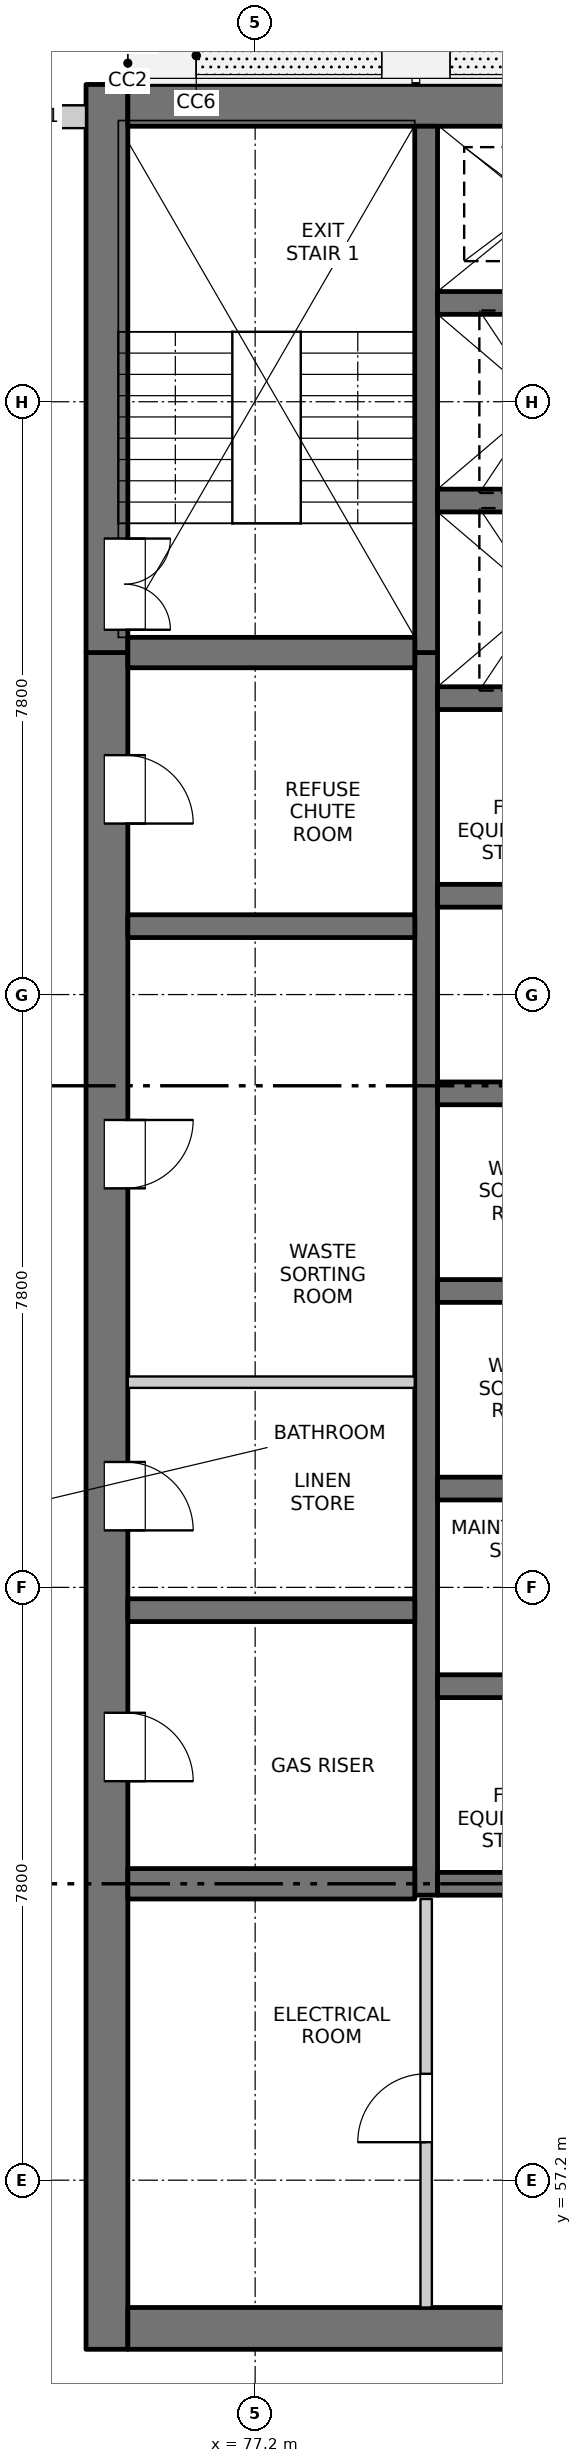
"""IFC4 building model, lengths in metres.
Left out: names, types, materials, properties, quantities, classifications, styles, units other than length and angle.
Written with IfcOpenShell. Run it as: python <this file> out.ifc"""

import sys

from ifc_helpers import new_model, si_unit, direction, frame, frame_2d, origin, place, context, subcontext, project, spatial, rectangle, extrude, element, fill, save


model = new_model("IFC4")
c1 = context("Model", 3, precision=1e-05, world=origin(), true_north=direction((0.0, 1.0)))
c2 = subcontext(c1, "Body", "Model", "MODEL_VIEW")
j1 = project(units=[si_unit("LENGTHUNIT", "METRE"), si_unit("PLANEANGLEUNIT", "RADIAN")], contexts=[c1])
p1 = place(None, origin())
s1 = spatial("IfcSite", under=j1, at=p1, CompositionType="ELEMENT")
p2 = place(p1, origin())
s2 = spatial("IfcBuilding", under=s1, at=p2, CompositionType="ELEMENT")
p3 = place(p2, frame((0.0, 0.0, 179.2)))
s3 = spatial("IfcBuildingStorey", under=s2, at=p3, CompositionType="ELEMENT", Elevation=179.2)
p4 = place(p3, frame((75.25, 54.975, -0.3), z_axis=(0.0, 0.0, 1.0), x_axis=(0.0, 1.0, 0.0)))
e1 = element("IfcWall", 1, at=p4, inside=s3, PredefinedType="SOLIDWALL", context=c2, shape_type="SweptSolid", body=[
    extrude(rectangle(XDim=22.325, YDim=0.55, at=frame_2d((11.163, 0.0))), origin(), (0.0, 0.0, 1.0), 3.45),
])
p5 = place(p4, frame((7.475, 0.0, 0.3)))
e2 = element("IfcOpeningElement", 2, at=p5, cuts=e1, PredefinedType="OPENING", context=c2, shape_type="SweptSolid", body=[
    extrude(rectangle(XDim=0.9, YDim=2.1, at=frame_2d((0.45, 1.05))), frame((0.0, 0.285, 0.0), z_axis=(0.0, -1.0, 0.0), x_axis=(1.0, 0.0, 0.0)), (0.0, 0.0, 1.0), 0.57),
])
p6 = place(p4, frame((10.775, 0.0, 0.3)))
e3 = element("IfcOpeningElement", 3, at=p6, cuts=e1, PredefinedType="OPENING", context=c2, shape_type="SweptSolid", body=[
    extrude(rectangle(XDim=0.9, YDim=2.1, at=frame_2d((0.45, 1.05))), frame((0.0, 0.285, 0.0), z_axis=(0.0, -1.0, 0.0), x_axis=(1.0, 0.0, 0.0)), (0.0, 0.0, 1.0), 0.57),
])
p7 = place(p4, frame((15.275, 0.0, 0.3)))
e4 = element("IfcOpeningElement", 4, at=p7, cuts=e1, PredefinedType="OPENING", context=c2, shape_type="SweptSolid", body=[
    extrude(rectangle(XDim=0.9, YDim=2.1, at=frame_2d((0.45, 1.05))), frame((0.0, 0.285, 0.0), z_axis=(0.0, -1.0, 0.0), x_axis=(1.0, 0.0, 0.0)), (0.0, 0.0, 1.0), 0.57),
])
p8 = place(p4, frame((20.075, 0.0, 0.3)))
e5 = element("IfcOpeningElement", 5, at=p8, cuts=e1, PredefinedType="OPENING", context=c2, shape_type="SweptSolid", body=[
    extrude(rectangle(XDim=0.9, YDim=2.1, at=frame_2d((0.45, 1.05))), frame((0.0, 0.285, 0.0), z_axis=(0.0, -1.0, 0.0), x_axis=(1.0, 0.0, 0.0)), (0.0, 0.0, 1.0), 0.57),
])
p9 = place(p3, frame((75.25, 77.3, -0.3), z_axis=(0.0, 0.0, 1.0), x_axis=(0.0, 1.0, 0.0)))
e6 = element("IfcWall", 6, at=p9, inside=s3, PredefinedType="SOLIDWALL", context=c2, shape_type="SweptSolid", body=[
    extrude(rectangle(XDim=7.475, YDim=0.55, at=frame_2d((3.737, 0.0))), origin(), (0.0, 0.0, 1.0), 3.45),
])
p10 = place(p9, frame((0.3, 0.0, 0.3)))
e7 = element("IfcOpeningElement", 7, at=p10, cuts=e6, PredefinedType="OPENING", context=c2, shape_type="SweptSolid", body=[
    extrude(rectangle(XDim=1.2, YDim=2.1, at=frame_2d((0.6, 1.05))), frame((0.0, 0.285, 0.0), z_axis=(0.0, -1.0, 0.0), x_axis=(1.0, 0.0, 0.0)), (0.0, 0.0, 1.0), 0.57),
])
p11 = place(p3, frame((75.525, 55.25, -0.3), z_axis=(0.0, 0.0, 1.0), x_axis=(1.0, 0.0, 0.0)))
e8 = element("IfcWall", 8, at=p11, inside=s3, PredefinedType="SOLIDWALL", context=c2, shape_type="SweptSolid", body=[
    extrude(rectangle(XDim=18.95, YDim=0.55, at=frame_2d((9.475, 0.0))), origin(), (0.0, 0.0, 1.0), 3.45),
])
p12 = place(p11, frame((8.725, 0.0, 0.3)))
e9 = element("IfcOpeningElement", 9, at=p12, cuts=e8, PredefinedType="OPENING", context=c2, shape_type="SweptSolid", body=[
    extrude(rectangle(XDim=1.5, YDim=2.1, at=frame_2d((0.75, 1.05))), frame((0.0, 0.285, 0.0), z_axis=(0.0, -1.0, 0.0), x_axis=(1.0, 0.0, 0.0)), (0.0, 0.0, 1.0), 0.57),
])
p13 = place(p3, frame((75.525, 84.5, -0.3), z_axis=(0.0, 0.0, 1.0), x_axis=(1.0, 0.0, 0.0)))
e10 = element("IfcWall", 10, at=p13, inside=s3, PredefinedType="SOLIDWALL", context=c2, shape_type="SweptSolid", body=[
    extrude(rectangle(XDim=18.95, YDim=0.55, at=frame_2d((9.475, 0.0))), origin(), (0.0, 0.0, 1.0), 3.45),
])
p14 = place(p3, frame((79.45, 60.95, -0.3), z_axis=(0.0, 0.0, 1.0), x_axis=(0.0, 1.0, 0.0)))
e11 = element("IfcWall", 11, at=p14, inside=s3, PredefinedType="SOLIDWALL", context=c2, shape_type="SweptSolid", body=[
    extrude(rectangle(XDim=16.35, YDim=0.3, at=frame_2d((8.175, 0.0))), origin(), (0.0, 0.0, 1.0), 3.45),
])
p15 = place(p3, frame((79.45, 77.3, -0.3), z_axis=(0.0, 0.0, 1.0), x_axis=(0.0, 1.0, 0.0)))
e12 = element("IfcWall", 12, at=p15, inside=s3, PredefinedType="SOLIDWALL", context=c2, shape_type="SweptSolid", body=[
    extrude(rectangle(XDim=6.925, YDim=0.3, at=frame_2d((3.462, 0.0))), origin(), (0.0, 0.0, 1.0), 3.45),
])
for number, where, z_axis, x_axis in (
    (13, (79.6, 61.1, -0.3), (0.0, 0.0, 1.0), (1.0, 0.0, 0.0)),
    (14, (79.6, 63.7, -0.3), (0.0, 0.0, 1.0), (1.0, 0.0, 0.0)),
    (15, (79.6, 66.3, -0.3), (0.0, 0.0, 1.0), (1.0, 0.0, 0.0)),
    (16, (79.6, 68.9, -0.3), (0.0, 0.0, 1.0), (1.0, 0.0, 0.0)),
    (17, (79.6, 71.5, -0.3), (0.0, 0.0, 1.0), (1.0, 0.0, 0.0)),
    (18, (79.6, 74.1, -0.3), (0.0, 0.0, 1.0), (1.0, 0.0, 0.0)),
    (19, (79.6, 76.7, -0.3), (0.0, 0.0, 1.0), (1.0, 0.0, 0.0)),
    (20, (79.6, 79.3, -0.3), (0.0, 0.0, 1.0), (1.0, 0.0, 0.0)),
    (21, (79.6, 81.9, -0.3), (0.0, 0.0, 1.0), (1.0, 0.0, 0.0)),
):
    element("IfcWall", number, at=place(p3, frame(where, z_axis=z_axis, x_axis=x_axis)), inside=s3, PredefinedType="SOLIDWALL", context=c2, shape_type="SweptSolid", body=[
        extrude(rectangle(XDim=3.0, YDim=0.3, at=frame_2d((1.5, 0.0))), origin(), (0.0, 0.0, 1.0), 3.45),
    ])
p16 = place(p3, frame((75.525, 61.1, -0.3), z_axis=(0.0, 0.0, 1.0), x_axis=(1.0, 0.0, 0.0)))
e22 = element("IfcWall", 22, at=p16, inside=s3, PredefinedType="SOLIDWALL", context=c2, shape_type="SweptSolid", body=[
    extrude(rectangle(XDim=3.775, YDim=0.4, at=frame_2d((1.888, 0.0))), origin(), (0.0, 0.0, 1.0), 3.45),
])
for number, where, z_axis, x_axis in (
    (23, (75.525, 64.7, -0.3), (0.0, 0.0, 1.0), (1.0, 0.0, 0.0)),
    (24, (75.525, 73.7, -0.3), (0.0, 0.0, 1.0), (1.0, 0.0, 0.0)),
):
    element("IfcWall", number, at=place(p3, frame(where, z_axis=z_axis, x_axis=x_axis)), inside=s3, PredefinedType="SOLIDWALL", context=c2, shape_type="SweptSolid", body=[
        extrude(rectangle(XDim=3.775, YDim=0.3, at=frame_2d((1.888, 0.0))), origin(), (0.0, 0.0, 1.0), 3.45),
    ])
p17 = place(p3, frame((75.525, 77.3, -0.3), z_axis=(0.0, 0.0, 1.0), x_axis=(1.0, 0.0, 0.0)))
e25 = element("IfcWall", 25, at=p17, inside=s3, PredefinedType="SOLIDWALL", context=c2, shape_type="SweptSolid", body=[
    extrude(rectangle(XDim=3.775, YDim=0.4, at=frame_2d((1.888, 0.0))), origin(), (0.0, 0.0, 1.0), 3.45),
])
p18 = place(p3, frame((73.675, 84.35, 0.0), z_axis=(0.0, 0.0, 1.0), x_axis=(1.0, 0.0, 0.0)))
e26 = element("IfcWall", 26, at=p18, inside=s3, PredefinedType="SOLIDWALL", context=c2, shape_type="SweptSolid", body=[
    extrude(rectangle(XDim=1.3, YDim=0.3, at=frame_2d((0.65, 0.0))), origin(), (0.0, 0.0, 1.0), 2.7),
])
p19 = place(p3, frame((75.525, 67.7, 0.0), z_axis=(0.0, 0.0, 1.0), x_axis=(1.0, 0.0, 0.0)))
e27 = element("IfcWall", 27, at=p19, inside=s3, PredefinedType="PARTITIONING", context=c2, shape_type="SweptSolid", body=[
    extrude(rectangle(XDim=3.775, YDim=0.15, at=frame_2d((1.887, 0.0))), origin(), (0.0, 0.0, 1.0), 3.15),
])
p20 = place(p3, frame((79.45, 55.525, 0.0), z_axis=(0.0, 0.0, 1.0), x_axis=(0.0, 1.0, 0.0)))
e28 = element("IfcWall", 28, at=p20, inside=s3, PredefinedType="PARTITIONING", context=c2, shape_type="SweptSolid", body=[
    extrude(rectangle(XDim=5.375, YDim=0.15, at=frame_2d((2.688, 0.0))), origin(), (0.0, 0.0, 1.0), 3.15),
])
p21 = place(p20, frame((2.175, 0.0, 0.0)))
e29 = element("IfcOpeningElement", 29, at=p21, cuts=e28, PredefinedType="OPENING", context=c2, shape_type="SweptSolid", body=[
    extrude(rectangle(XDim=0.9, YDim=2.1, at=frame_2d((0.45, 1.05))), frame((0.0, 0.085, 0.0), z_axis=(0.0, -1.0, 0.0), x_axis=(1.0, 0.0, 0.0)), (0.0, 0.0, 1.0), 0.17),
])
p22 = place(p21, origin())
e30 = element("IfcDoor", 30, at=p22, inside=s3, OperationType="SINGLE_SWING_LEFT", PredefinedType="DOOR", context=c2, shape_type="SweptSolid", body=[
    extrude(rectangle(XDim=0.9, YDim=2.1, at=frame_2d((0.45, 1.05))), frame((0.0, 0.025, 0.0), z_axis=(0.0, -1.0, 0.0), x_axis=(1.0, 0.0, 0.0)), (0.0, 0.0, 1.0), 0.05),
])
fill(e29, e30)
p23 = place(p5, origin())
e31 = element("IfcDoor", 31, at=p23, inside=s3, OperationType="SINGLE_SWING_RIGHT", PredefinedType="DOOR", context=c2, shape_type="SweptSolid", body=[
    extrude(rectangle(XDim=0.9, YDim=2.1, at=frame_2d((0.45, 1.05))), frame((0.0, -0.21, 0.0), z_axis=(0.0, -1.0, 0.0), x_axis=(1.0, 0.0, 0.0)), (0.0, 0.0, 1.0), 0.05),
])
fill(e2, e31)
p24 = place(p6, origin())
e32 = element("IfcDoor", 32, at=p24, inside=s3, OperationType="SINGLE_SWING_RIGHT", PredefinedType="DOOR", context=c2, shape_type="SweptSolid", body=[
    extrude(rectangle(XDim=0.9, YDim=2.1, at=frame_2d((0.45, 1.05))), frame((0.0, -0.21, 0.0), z_axis=(0.0, -1.0, 0.0), x_axis=(1.0, 0.0, 0.0)), (0.0, 0.0, 1.0), 0.05),
])
fill(e3, e32)
p25 = place(p7, origin())
e33 = element("IfcDoor", 33, at=p25, inside=s3, OperationType="SINGLE_SWING_LEFT", PredefinedType="DOOR", context=c2, shape_type="SweptSolid", body=[
    extrude(rectangle(XDim=0.9, YDim=2.1, at=frame_2d((0.45, 1.05))), frame((0.0, -0.21, 0.0), z_axis=(0.0, -1.0, 0.0), x_axis=(1.0, 0.0, 0.0)), (0.0, 0.0, 1.0), 0.05),
])
fill(e4, e33)
p26 = place(p8, origin())
e34 = element("IfcDoor", 34, at=p26, inside=s3, OperationType="SINGLE_SWING_RIGHT", PredefinedType="DOOR", context=c2, shape_type="SweptSolid", body=[
    extrude(rectangle(XDim=0.9, YDim=2.1, at=frame_2d((0.45, 1.05))), frame((0.0, -0.21, 0.0), z_axis=(0.0, -1.0, 0.0), x_axis=(1.0, 0.0, 0.0)), (0.0, 0.0, 1.0), 0.05),
])
fill(e5, e34)
p27 = place(p10, origin())
e35 = element("IfcDoor", 35, at=p27, inside=s3, OperationType="DOUBLE_DOOR_SINGLE_SWING", PredefinedType="DOOR", context=c2, shape_type="SweptSolid", body=[
    extrude(rectangle(XDim=1.2, YDim=2.1, at=frame_2d((0.6, 1.05))), frame((0.0, -0.21, 0.0), z_axis=(0.0, -1.0, 0.0), x_axis=(1.0, 0.0, 0.0)), (0.0, 0.0, 1.0), 0.05),
])
fill(e7, e35)
save(model, sys.argv[1])
